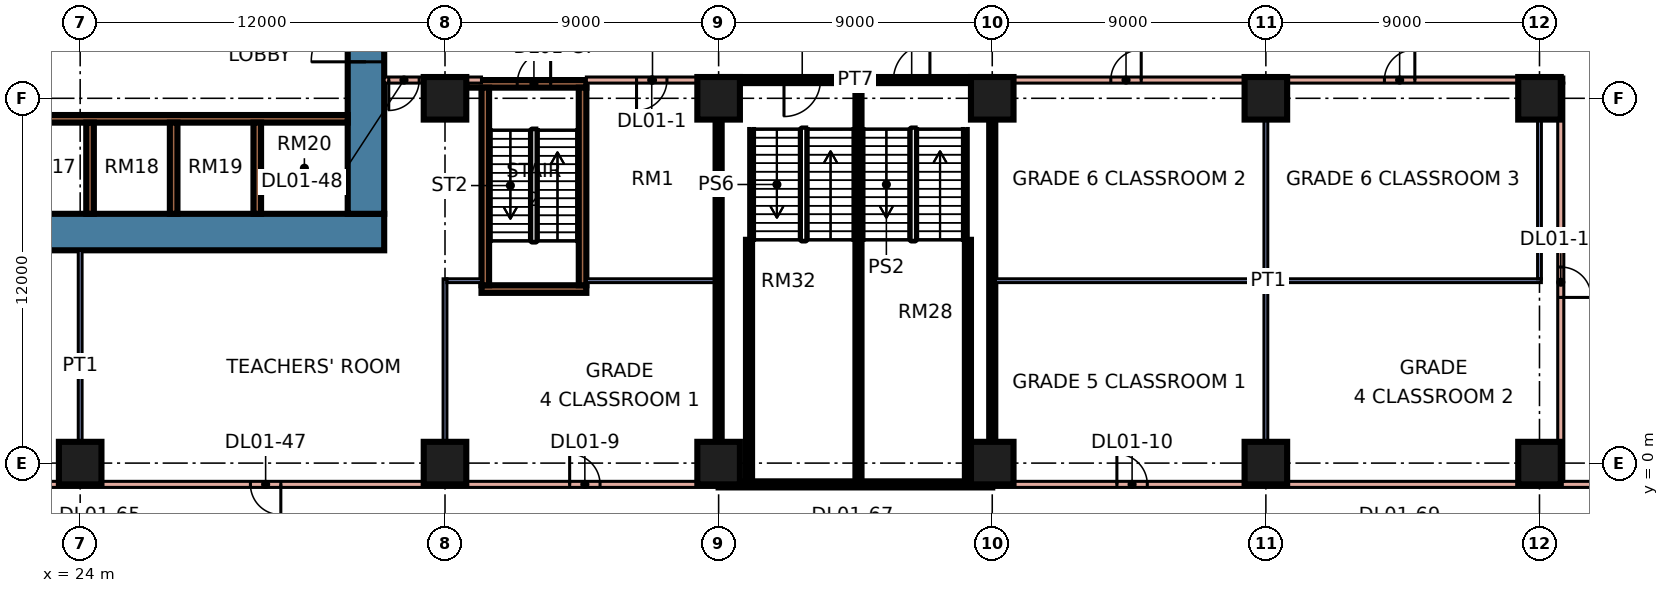
"""IFC4 building model, lengths in metres.
Left out: names, types, materials, properties, quantities, classifications, styles, units other than length and angle.
Written with IfcOpenShell. Run it as: python <this file> out.ifc"""

import sys

from ifc_helpers import new_model, si_unit, direction, frame, frame_2d, origin, origin_2d, place, context, subcontext, project, spatial, rectangle, extrude, element, fill, save


model = new_model("IFC4")
c1 = context("Model", 3, precision=1e-05, world=origin(), true_north=direction((0.0, 1.0)))
c2 = subcontext(c1, "Body", "Model", "MODEL_VIEW")
j1 = project(units=[si_unit("LENGTHUNIT", "METRE"), si_unit("PLANEANGLEUNIT", "RADIAN")], contexts=[c1])
p1 = place(None, origin())
s1 = spatial("IfcSite", under=j1, at=p1, CompositionType="ELEMENT")
p2 = place(p1, origin())
s2 = spatial("IfcBuilding", under=s1, at=p2, CompositionType="ELEMENT")
p3 = place(p2, frame((0.0, 0.0, 7.2)))
s3 = spatial("IfcBuildingStorey", under=s2, at=p3, CompositionType="ELEMENT", Elevation=7.2)
for number, where, z_axis, x_axis in (
    (1, (24.0, 0.0, 0.0), (0.0, 0.0, 1.0), (1.0, 0.0, 0.0)),
    (2, (36.0, 0.0, 0.0), (0.0, 0.0, 1.0), (1.0, 0.0, 0.0)),
    (3, (45.0, 0.0, 0.0), (0.0, 0.0, 1.0), (1.0, 0.0, 0.0)),
    (4, (54.0, 0.0, 0.0), (0.0, 0.0, 1.0), (1.0, 0.0, 0.0)),
    (5, (63.0, 0.0, 0.0), (0.0, 0.0, 1.0), (1.0, 0.0, 0.0)),
    (6, (72.0, 0.0, 0.0), (0.0, 0.0, 1.0), (1.0, 0.0, 0.0)),
    (7, (36.0, 12.0, 0.0), (0.0, 0.0, 1.0), (1.0, 0.0, 0.0)),
    (8, (45.0, 12.0, 0.0), (0.0, 0.0, 1.0), (1.0, 0.0, 0.0)),
    (9, (54.0, 12.0, 0.0), (0.0, 0.0, 1.0), (1.0, 0.0, 0.0)),
    (10, (63.0, 12.0, 0.0), (0.0, 0.0, 1.0), (1.0, 0.0, 0.0)),
    (11, (72.0, 12.0, 0.0), (0.0, 0.0, 1.0), (1.0, 0.0, 0.0)),
):
    element("IfcColumn", number, at=place(p3, frame(where, z_axis=z_axis, x_axis=x_axis)), inside=s3, PredefinedType="COLUMN", context=c2, shape_type="SweptSolid", body=[
        extrude(rectangle(XDim=1.4, YDim=1.4, at=origin_2d()), origin(), (0.0, 0.0, 1.0), 4.8),
    ])
p4 = place(p3, frame((9.0, 7.6, 0.0), z_axis=(0.0, 0.0, 1.0), x_axis=(1.0, 0.0, 0.0)))
e12 = element("IfcWall", 12, at=p4, inside=s3, PredefinedType="SHEAR", context=c2, shape_type="SweptSolid", body=[
    extrude(rectangle(XDim=25.0, YDim=1.2, at=frame_2d((12.5, 0.0))), origin(), (0.0, 0.0, 1.0), 4.8),
])
p5 = place(p3, frame((33.4, 8.2, 0.0), z_axis=(0.0, 0.0, 1.0), x_axis=(0.0, 1.0, 0.0)))
e13 = element("IfcWall", 13, at=p5, inside=s3, PredefinedType="SHEAR", context=c2, shape_type="SweptSolid", body=[
    extrude(rectangle(XDim=10.6, YDim=1.2, at=frame_2d((5.3, 0.0))), origin(), (0.0, 0.0, 1.0), 4.8),
])
p6 = place(p5, frame((5.0, 0.0, 0.0)))
e14 = element("IfcOpeningElement", 14, at=p6, cuts=e13, PredefinedType="OPENING", context=c2, shape_type="SweptSolid", body=[
    extrude(rectangle(XDim=1.8, YDim=2.4, at=frame_2d((0.9, 1.2))), frame((0.0, 0.61, 0.0), z_axis=(0.0, -1.0, 0.0), x_axis=(1.0, 0.0, 0.0)), (0.0, 0.0, 1.0), 1.22),
])
p7 = place(p3, frame((13.45, 11.325, 0.0), z_axis=(0.0, 0.0, 1.0), x_axis=(1.0, 0.0, 0.0)))
e15 = element("IfcWall", 15, at=p7, inside=s3, PredefinedType="SHEAR", context=c2, shape_type="SweptSolid", body=[
    extrude(rectangle(XDim=19.35, YDim=0.25, at=frame_2d((9.675, 0.0))), origin(), (0.0, 0.0, 1.0), 4.8),
])
for number, where, z_axis, x_axis in (
    (16, (24.325, 8.2, 0.0), (0.0, 0.0, 1.0), (0.0, 1.0, 0.0)),
    (17, (27.075, 8.2, 0.0), (0.0, 0.0, 1.0), (0.0, 1.0, 0.0)),
    (18, (29.825, 8.2, 0.0), (0.0, 0.0, 1.0), (0.0, 1.0, 0.0)),
):
    element("IfcWall", number, at=place(p3, frame(where, z_axis=z_axis, x_axis=x_axis)), inside=s3, PredefinedType="SHEAR", context=c2, shape_type="SweptSolid", body=[
        extrude(rectangle(XDim=3.0, YDim=0.25, at=frame_2d((1.5, 0.0))), origin(), (0.0, 0.0, 1.0), 4.8),
    ])
p8 = place(p3, frame((37.2, 5.725, 0.0), z_axis=(0.0, 0.0, 1.0), x_axis=(1.0, 0.0, 0.0)))
e19 = element("IfcWall", 19, at=p8, inside=s3, PredefinedType="SHEAR", context=c2, shape_type="SweptSolid", body=[
    extrude(rectangle(XDim=3.45, YDim=0.25, at=frame_2d((1.725, 0.0))), origin(), (0.0, 0.0, 1.0), 4.8),
])
p9 = place(p3, frame((36.7, 12.475, 0.0), z_axis=(0.0, 0.0, 1.0), x_axis=(1.0, 0.0, 0.0)))
e20 = element("IfcWall", 20, at=p9, inside=s3, PredefinedType="SHEAR", context=c2, shape_type="SweptSolid", body=[
    extrude(rectangle(XDim=3.95, YDim=0.25, at=frame_2d((1.975, 0.0))), origin(), (0.0, 0.0, 1.0), 4.8),
])
p10 = place(p9, frame((1.675, 0.0, 0.0)))
e21 = element("IfcOpeningElement", 21, at=p10, cuts=e20, PredefinedType="OPENING", context=c2, shape_type="SweptSolid", body=[
    extrude(rectangle(XDim=1.1, YDim=2.2, at=frame_2d((0.55, 1.1))), frame((0.0, 0.135, 0.0), z_axis=(0.0, -1.0, 0.0), x_axis=(1.0, 0.0, 0.0)), (0.0, 0.0, 1.0), 0.27),
])
for number, where, z_axis, x_axis in (
    (22, (37.325, 5.85, 0.0), (0.0, 0.0, 1.0), (0.0, 1.0, 0.0)),
    (23, (40.525, 5.85, 0.0), (0.0, 0.0, 1.0), (0.0, 1.0, 0.0)),
):
    element("IfcWall", number, at=place(p3, frame(where, z_axis=z_axis, x_axis=x_axis)), inside=s3, PredefinedType="SHEAR", context=c2, shape_type="SweptSolid", body=[
        extrude(rectangle(XDim=6.5, YDim=0.25, at=frame_2d((3.25, 0.0))), origin(), (0.0, 0.0, 1.0), 4.8),
    ])
p11 = place(p3, frame((-0.8, -0.7, 0.0), z_axis=(0.0, 0.0, 1.0), x_axis=(1.0, 0.0, 0.0)))
e24 = element("IfcWall", 24, at=p11, inside=s3, PredefinedType="PARTITIONING", context=c2, shape_type="SweptSolid", body=[
    extrude(rectangle(XDim=45.8, YDim=0.2, at=frame_2d((22.9, 0.0))), origin(), (0.0, 0.0, 1.0), 4.4),
])
p12 = place(p11, frame((40.9, 0.0, 0.0)))
e25 = element("IfcOpeningElement", 25, at=p12, cuts=e24, PredefinedType="OPENING", context=c2, shape_type="SweptSolid", body=[
    extrude(rectangle(XDim=1.0, YDim=2.1, at=frame_2d((0.5, 1.05))), frame((0.0, 0.11, 0.0), z_axis=(0.0, -1.0, 0.0), x_axis=(1.0, 0.0, 0.0)), (0.0, 0.0, 1.0), 0.22),
])
p13 = place(p11, frame((5.9, 0.0, 0.0)))
e26 = element("IfcOpeningElement", 26, at=p13, cuts=e24, PredefinedType="OPENING", context=c2, shape_type="SweptSolid", body=[
    extrude(rectangle(XDim=1.0, YDim=2.1, at=frame_2d((0.5, 1.05))), frame((0.0, 0.11, 0.0), z_axis=(0.0, -1.0, 0.0), x_axis=(1.0, 0.0, 0.0)), (0.0, 0.0, 1.0), 0.22),
])
p14 = place(p11, frame((10.9, 0.0, 0.0)))
e27 = element("IfcOpeningElement", 27, at=p14, cuts=e24, PredefinedType="OPENING", context=c2, shape_type="SweptSolid", body=[
    extrude(rectangle(XDim=1.0, YDim=2.1, at=frame_2d((0.5, 1.05))), frame((0.0, 0.11, 0.0), z_axis=(0.0, -1.0, 0.0), x_axis=(1.0, 0.0, 0.0)), (0.0, 0.0, 1.0), 0.22),
])
p15 = place(p11, frame((18.4, 0.0, 0.0)))
e28 = element("IfcOpeningElement", 28, at=p15, cuts=e24, PredefinedType="OPENING", context=c2, shape_type="SweptSolid", body=[
    extrude(rectangle(XDim=1.0, YDim=2.1, at=frame_2d((0.5, 1.05))), frame((0.0, 0.11, 0.0), z_axis=(0.0, -1.0, 0.0), x_axis=(1.0, 0.0, 0.0)), (0.0, 0.0, 1.0), 0.22),
])
p16 = place(p11, frame((30.4, 0.0, 0.0)))
e29 = element("IfcOpeningElement", 29, at=p16, cuts=e24, PredefinedType="OPENING", context=c2, shape_type="SweptSolid", body=[
    extrude(rectangle(XDim=1.0, YDim=2.1, at=frame_2d((0.5, 1.05))), frame((0.0, 0.11, 0.0), z_axis=(0.0, -1.0, 0.0), x_axis=(1.0, 0.0, 0.0)), (0.0, 0.0, 1.0), 0.22),
])
p17 = place(p3, frame((24.0, -0.6, 0.0), z_axis=(0.0, 0.0, 1.0), x_axis=(0.0, 1.0, 0.0)))
e30 = element("IfcWall", 30, at=p17, inside=s3, PredefinedType="PARTITIONING", context=c2, shape_type="SweptSolid", body=[
    extrude(rectangle(XDim=7.6, YDim=0.125, at=frame_2d((3.8, 0.0))), origin(), (0.0, 0.0, 1.0), 4.4),
])
p18 = place(p3, frame((34.0, 12.6, 0.0), z_axis=(0.0, 0.0, 1.0), x_axis=(1.0, 0.0, 0.0)))
e31 = element("IfcWall", 31, at=p18, inside=s3, PredefinedType="PARTITIONING", context=c2, shape_type="SweptSolid", body=[
    extrude(rectangle(XDim=3.2, YDim=0.2, at=frame_2d((1.6, 0.0))), origin(), (0.0, 0.0, 1.0), 4.4),
])
p19 = place(p18, frame((0.15, 0.0, 0.0)))
e32 = element("IfcOpeningElement", 32, at=p19, cuts=e31, PredefinedType="OPENING", context=c2, shape_type="SweptSolid", body=[
    extrude(rectangle(XDim=1.0, YDim=2.1, at=frame_2d((0.5, 1.05))), frame((0.0, 0.11, 0.0), z_axis=(0.0, -1.0, 0.0), x_axis=(1.0, 0.0, 0.0)), (0.0, 0.0, 1.0), 0.22),
])
p20 = place(p3, frame((36.0, -0.6, 0.0), z_axis=(0.0, 0.0, 1.0), x_axis=(0.0, 1.0, 0.0)))
e33 = element("IfcWall", 33, at=p20, inside=s3, PredefinedType="PARTITIONING", context=c2, shape_type="SweptSolid", body=[
    extrude(rectangle(XDim=6.662, YDim=0.125, at=frame_2d((3.331, 0.0))), origin(), (0.0, 0.0, 1.0), 4.4),
])
p21 = place(p3, frame((36.062, 6.0, 0.0), z_axis=(0.0, 0.0, 1.0), x_axis=(1.0, 0.0, 0.0)))
e34 = element("IfcWall", 34, at=p21, inside=s3, PredefinedType="PARTITIONING", context=c2, shape_type="SweptSolid", body=[
    extrude(rectangle(XDim=1.138, YDim=0.125, at=frame_2d((0.569, 0.0))), origin(), (0.0, 0.0, 1.0), 4.4),
])
p22 = place(p3, frame((40.65, 6.0, 0.0), z_axis=(0.0, 0.0, 1.0), x_axis=(1.0, 0.0, 0.0)))
e35 = element("IfcWall", 35, at=p22, inside=s3, PredefinedType="PARTITIONING", context=c2, shape_type="SweptSolid", body=[
    extrude(rectangle(XDim=4.25, YDim=0.125, at=frame_2d((2.125, 0.0))), origin(), (0.0, 0.0, 1.0), 4.4),
])
p23 = place(p3, frame((40.65, 12.6, 0.0), z_axis=(0.0, 0.0, 1.0), x_axis=(1.0, 0.0, 0.0)))
e36 = element("IfcWall", 36, at=p23, inside=s3, PredefinedType="PARTITIONING", context=c2, shape_type="SweptSolid", body=[
    extrude(rectangle(XDim=4.35, YDim=0.2, at=frame_2d((2.175, 0.0))), origin(), (0.0, 0.0, 1.0), 4.4),
])
p24 = place(p23, frame((1.65, 0.0, 0.0)))
e37 = element("IfcOpeningElement", 37, at=p24, cuts=e36, PredefinedType="OPENING", context=c2, shape_type="SweptSolid", body=[
    extrude(rectangle(XDim=1.0, YDim=2.1, at=frame_2d((0.5, 1.05))), frame((0.0, 0.11, 0.0), z_axis=(0.0, -1.0, 0.0), x_axis=(1.0, 0.0, 0.0)), (0.0, 0.0, 1.0), 0.22),
])
p25 = place(p3, frame((45.0, -0.7, 0.0), z_axis=(0.0, 0.0, 1.0), x_axis=(1.0, 0.0, 0.0)))
e38 = element("IfcWall", 38, at=p25, inside=s3, PredefinedType="SOLIDWALL", context=c2, shape_type="SweptSolid", body=[
    extrude(rectangle(XDim=9.0, YDim=0.2, at=frame_2d((4.5, 0.0))), origin(), (0.0, 0.0, 1.0), 4.4),
])
p26 = place(p3, frame((45.0, -0.6, 0.0), z_axis=(0.0, 0.0, 1.0), x_axis=(0.0, 1.0, 0.0)))
e39 = element("IfcWall", 39, at=p26, inside=s3, PredefinedType="SOLIDWALL", context=c2, shape_type="SweptSolid", body=[
    extrude(rectangle(XDim=13.1, YDim=0.2, at=frame_2d((6.55, 0.0))), origin(), (0.0, 0.0, 1.0), 4.4),
])
p27 = place(p3, frame((45.0, 12.6, 0.0), z_axis=(0.0, 0.0, 1.0), x_axis=(1.0, 0.0, 0.0)))
e40 = element("IfcWall", 40, at=p27, inside=s3, PredefinedType="SOLIDWALL", context=c2, shape_type="SweptSolid", body=[
    extrude(rectangle(XDim=9.0, YDim=0.2, at=frame_2d((4.5, 0.0))), origin(), (0.0, 0.0, 1.0), 4.4),
])
p28 = place(p27, frame((5.75, 0.0, 0.0)))
e41 = element("IfcOpeningElement", 41, at=p28, cuts=e40, PredefinedType="OPENING", context=c2, shape_type="SweptSolid", body=[
    extrude(rectangle(XDim=1.2, YDim=2.1, at=frame_2d((0.6, 1.05))), frame((0.0, 0.11, 0.0), z_axis=(0.0, -1.0, 0.0), x_axis=(1.0, 0.0, 0.0)), (0.0, 0.0, 1.0), 0.22),
])
p29 = place(p27, frame((2.15, 0.0, 0.0)))
e42 = element("IfcOpeningElement", 42, at=p29, cuts=e40, PredefinedType="OPENING", context=c2, shape_type="SweptSolid", body=[
    extrude(rectangle(XDim=1.2, YDim=2.1, at=frame_2d((0.6, 1.05))), frame((0.0, 0.11, 0.0), z_axis=(0.0, -1.0, 0.0), x_axis=(1.0, 0.0, 0.0)), (0.0, 0.0, 1.0), 0.22),
])
p30 = place(p3, frame((49.6, -0.6, 0.0), z_axis=(0.0, 0.0, 1.0), x_axis=(0.0, 1.0, 0.0)))
e43 = element("IfcWall", 43, at=p30, inside=s3, PredefinedType="SOLIDWALL", context=c2, shape_type="SweptSolid", body=[
    extrude(rectangle(XDim=13.1, YDim=0.2, at=frame_2d((6.55, 0.0))), origin(), (0.0, 0.0, 1.0), 4.4),
])
p31 = place(p3, frame((54.0, -0.7, 0.0), z_axis=(0.0, 0.0, 1.0), x_axis=(1.0, 0.0, 0.0)))
e44 = element("IfcWall", 44, at=p31, inside=s3, PredefinedType="PARTITIONING", context=c2, shape_type="SweptSolid", body=[
    extrude(rectangle(XDim=21.0, YDim=0.2, at=frame_2d((10.5, 0.0))), origin(), (0.0, 0.0, 1.0), 4.4),
])
p32 = place(p31, frame((4.1, 0.0, 0.0)))
e45 = element("IfcOpeningElement", 45, at=p32, cuts=e44, PredefinedType="OPENING", context=c2, shape_type="SweptSolid", body=[
    extrude(rectangle(XDim=1.0, YDim=2.1, at=frame_2d((0.5, 1.05))), frame((0.0, 0.11, 0.0), z_axis=(0.0, -1.0, 0.0), x_axis=(1.0, 0.0, 0.0)), (0.0, 0.0, 1.0), 0.22),
])
p33 = place(p3, frame((54.0, -0.6, 0.0), z_axis=(0.0, 0.0, 1.0), x_axis=(0.0, 1.0, 0.0)))
e46 = element("IfcWall", 46, at=p33, inside=s3, PredefinedType="SOLIDWALL", context=c2, shape_type="SweptSolid", body=[
    extrude(rectangle(XDim=13.1, YDim=0.2, at=frame_2d((6.55, 0.0))), origin(), (0.0, 0.0, 1.0), 4.4),
])
p34 = place(p3, frame((54.0, 12.6, 0.0), z_axis=(0.0, 0.0, 1.0), x_axis=(1.0, 0.0, 0.0)))
e47 = element("IfcWall", 47, at=p34, inside=s3, PredefinedType="PARTITIONING", context=c2, shape_type="SweptSolid", body=[
    extrude(rectangle(XDim=18.8, YDim=0.2, at=frame_2d((9.4, 0.0))), origin(), (0.0, 0.0, 1.0), 4.4),
])
p35 = place(p34, frame((3.9, 0.0, 0.0)))
e48 = element("IfcOpeningElement", 48, at=p35, cuts=e47, PredefinedType="OPENING", context=c2, shape_type="SweptSolid", body=[
    extrude(rectangle(XDim=1.0, YDim=2.1, at=frame_2d((0.5, 1.05))), frame((0.0, 0.11, 0.0), z_axis=(0.0, -1.0, 0.0), x_axis=(1.0, 0.0, 0.0)), (0.0, 0.0, 1.0), 0.22),
])
p36 = place(p34, frame((12.9, 0.0, 0.0)))
e49 = element("IfcOpeningElement", 49, at=p36, cuts=e47, PredefinedType="OPENING", context=c2, shape_type="SweptSolid", body=[
    extrude(rectangle(XDim=1.0, YDim=2.1, at=frame_2d((0.5, 1.05))), frame((0.0, 0.11, 0.0), z_axis=(0.0, -1.0, 0.0), x_axis=(1.0, 0.0, 0.0)), (0.0, 0.0, 1.0), 0.22),
])
p37 = place(p3, frame((54.1, 6.0, 0.0), z_axis=(0.0, 0.0, 1.0), x_axis=(1.0, 0.0, 0.0)))
e50 = element("IfcWall", 50, at=p37, inside=s3, PredefinedType="PARTITIONING", context=c2, shape_type="SweptSolid", body=[
    extrude(rectangle(XDim=17.962, YDim=0.125, at=frame_2d((8.981, 0.0))), origin(), (0.0, 0.0, 1.0), 4.4),
])
p38 = place(p3, frame((63.0, -0.6, 0.0), z_axis=(0.0, 0.0, 1.0), x_axis=(0.0, 1.0, 0.0)))
e51 = element("IfcWall", 51, at=p38, inside=s3, PredefinedType="PARTITIONING", context=c2, shape_type="SweptSolid", body=[
    extrude(rectangle(XDim=6.538, YDim=0.125, at=frame_2d((3.269, 0.0))), origin(), (0.0, 0.0, 1.0), 4.4),
])
for number, where, z_axis, x_axis in (
    (52, (63.0, 6.062, 0.0), (0.0, 0.0, 1.0), (0.0, 1.0, 0.0)),
    (53, (72.0, 6.062, 0.0), (0.0, 0.0, 1.0), (0.0, 1.0, 0.0)),
):
    element("IfcWall", number, at=place(p3, frame(where, z_axis=z_axis, x_axis=x_axis)), inside=s3, PredefinedType="PARTITIONING", context=c2, shape_type="SweptSolid", body=[
        extrude(rectangle(XDim=6.438, YDim=0.125, at=frame_2d((3.219, 0.0))), origin(), (0.0, 0.0, 1.0), 4.4),
    ])
p39 = place(p3, frame((72.7, -0.6, 0.0), z_axis=(0.0, 0.0, 1.0), x_axis=(0.0, 1.0, 0.0)))
e54 = element("IfcWall", 54, at=p39, inside=s3, PredefinedType="PARTITIONING", context=c2, shape_type="SweptSolid", body=[
    extrude(rectangle(XDim=13.1, YDim=0.2, at=frame_2d((6.55, 0.0))), origin(), (0.0, 0.0, 1.0), 4.4),
])
p40 = place(p39, frame((6.05, 0.0, 0.0)))
e55 = element("IfcOpeningElement", 55, at=p40, cuts=e54, PredefinedType="OPENING", context=c2, shape_type="SweptSolid", body=[
    extrude(rectangle(XDim=1.0, YDim=2.1, at=frame_2d((0.5, 1.05))), frame((0.0, 0.11, 0.0), z_axis=(0.0, -1.0, 0.0), x_axis=(1.0, 0.0, 0.0)), (0.0, 0.0, 1.0), 0.22),
])
for number, where, z_axis, x_axis in (
    (56, (53.2, -0.6, 0.0), (0.0, 0.0, 1.0), (0.0, 1.0, 0.0)),
    (57, (46.0, -0.6, 0.0), (0.0, 0.0, 1.0), (0.0, 1.0, 0.0)),
):
    element("IfcWall", number, at=place(p3, frame(where, z_axis=z_axis, x_axis=x_axis)), inside=s3, PredefinedType="SOLIDWALL", context=c2, shape_type="SweptSolid", body=[
        extrude(rectangle(XDim=7.945, YDim=0.2, at=frame_2d((3.973, 0.0))), origin(), (0.0, 0.0, 1.0), 4.4),
    ])
p41 = place(p6, origin())
e58 = element("IfcDoor", 58, at=p41, inside=s3, OperationType="DOUBLE_DOOR_SINGLE_SWING", PredefinedType="DOOR", context=c2, shape_type="SweptSolid", body=[
    extrude(rectangle(XDim=1.8, YDim=2.4, at=frame_2d((0.9, 1.2))), frame((0.0, 0.025, 0.0), z_axis=(0.0, -1.0, 0.0), x_axis=(1.0, 0.0, 0.0)), (0.0, 0.0, 1.0), 0.05),
])
fill(e14, e58)
p42 = place(p10, frame((1.1, 0.0, 0.0), z_axis=(0.0, 0.0, 1.0), x_axis=(-1.0, 0.0, 0.0)))
e59 = element("IfcDoor", 59, at=p42, inside=s3, OperationType="SINGLE_SWING_RIGHT", PredefinedType="DOOR", context=c2, shape_type="SweptSolid", body=[
    extrude(rectangle(XDim=1.1, YDim=2.2, at=frame_2d((0.55, 1.1))), frame((0.0, 0.025, 0.0), z_axis=(0.0, -1.0, 0.0), x_axis=(1.0, 0.0, 0.0)), (0.0, 0.0, 1.0), 0.05),
])
fill(e21, e59)
p43 = place(p24, frame((1.0, 0.0, 0.0), z_axis=(0.0, 0.0, 1.0), x_axis=(-1.0, 0.0, 0.0)))
e60 = element("IfcDoor", 60, at=p43, inside=s3, OperationType="SINGLE_SWING_LEFT", PredefinedType="DOOR", context=c2, shape_type="SweptSolid", body=[
    extrude(rectangle(XDim=1.0, YDim=2.1, at=frame_2d((0.5, 1.05))), frame((0.0, 0.025, 0.0), z_axis=(0.0, -1.0, 0.0), x_axis=(1.0, 0.0, 0.0)), (0.0, 0.0, 1.0), 0.05),
])
fill(e37, e60)
p44 = place(p35, frame((1.0, 0.0, 0.0), z_axis=(0.0, 0.0, 1.0), x_axis=(-1.0, 0.0, 0.0)))
e61 = element("IfcDoor", 61, at=p44, inside=s3, OperationType="SINGLE_SWING_RIGHT", PredefinedType="DOOR", context=c2, shape_type="SweptSolid", body=[
    extrude(rectangle(XDim=1.0, YDim=2.1, at=frame_2d((0.5, 1.05))), frame((0.0, 0.025, 0.0), z_axis=(0.0, -1.0, 0.0), x_axis=(1.0, 0.0, 0.0)), (0.0, 0.0, 1.0), 0.05),
])
fill(e48, e61)
p45 = place(p36, frame((1.0, 0.0, 0.0), z_axis=(0.0, 0.0, 1.0), x_axis=(-1.0, 0.0, 0.0)))
e62 = element("IfcDoor", 62, at=p45, inside=s3, OperationType="SINGLE_SWING_RIGHT", PredefinedType="DOOR", context=c2, shape_type="SweptSolid", body=[
    extrude(rectangle(XDim=1.0, YDim=2.1, at=frame_2d((0.5, 1.05))), frame((0.0, 0.025, 0.0), z_axis=(0.0, -1.0, 0.0), x_axis=(1.0, 0.0, 0.0)), (0.0, 0.0, 1.0), 0.05),
])
fill(e49, e62)
p46 = place(p12, origin())
e63 = element("IfcDoor", 63, at=p46, inside=s3, OperationType="SINGLE_SWING_LEFT", PredefinedType="DOOR", context=c2, shape_type="SweptSolid", body=[
    extrude(rectangle(XDim=1.0, YDim=2.1, at=frame_2d((0.5, 1.05))), frame((0.0, 0.025, 0.0), z_axis=(0.0, -1.0, 0.0), x_axis=(1.0, 0.0, 0.0)), (0.0, 0.0, 1.0), 0.05),
])
fill(e25, e63)
p47 = place(p32, origin())
e64 = element("IfcDoor", 64, at=p47, inside=s3, OperationType="SINGLE_SWING_LEFT", PredefinedType="DOOR", context=c2, shape_type="SweptSolid", body=[
    extrude(rectangle(XDim=1.0, YDim=2.1, at=frame_2d((0.5, 1.05))), frame((0.0, 0.025, 0.0), z_axis=(0.0, -1.0, 0.0), x_axis=(1.0, 0.0, 0.0)), (0.0, 0.0, 1.0), 0.05),
])
fill(e45, e64)
p48 = place(p40, frame((1.0, 0.0, 0.0), z_axis=(0.0, 0.0, 1.0), x_axis=(-1.0, 0.0, 0.0)))
e65 = element("IfcDoor", 65, at=p48, inside=s3, OperationType="SINGLE_SWING_LEFT", PredefinedType="DOOR", context=c2, shape_type="SweptSolid", body=[
    extrude(rectangle(XDim=1.0, YDim=2.1, at=frame_2d((0.5, 1.05))), frame((0.0, 0.025, 0.0), z_axis=(0.0, -1.0, 0.0), x_axis=(1.0, 0.0, 0.0)), (0.0, 0.0, 1.0), 0.05),
])
fill(e55, e65)
p49 = place(p16, origin())
e66 = element("IfcDoor", 66, at=p49, inside=s3, OperationType="SINGLE_SWING_RIGHT", PredefinedType="DOOR", context=c2, shape_type="SweptSolid", body=[
    extrude(rectangle(XDim=1.0, YDim=2.1, at=frame_2d((0.5, 1.05))), frame((0.0, 0.025, 0.0), z_axis=(0.0, -1.0, 0.0), x_axis=(1.0, 0.0, 0.0)), (0.0, 0.0, 1.0), 0.05),
])
fill(e29, e66)
p50 = place(p19, frame((1.0, 0.0, 0.0), z_axis=(0.0, 0.0, 1.0), x_axis=(-1.0, 0.0, 0.0)))
e67 = element("IfcDoor", 67, at=p50, inside=s3, OperationType="SINGLE_SWING_LEFT", PredefinedType="DOOR", context=c2, shape_type="SweptSolid", body=[
    extrude(rectangle(XDim=1.0, YDim=2.1, at=frame_2d((0.5, 1.05))), frame((0.0, 0.025, 0.0), z_axis=(0.0, -1.0, 0.0), x_axis=(1.0, 0.0, 0.0)), (0.0, 0.0, 1.0), 0.05),
])
fill(e32, e67)
p51 = place(p28, frame((1.2, 0.0, 0.0), z_axis=(0.0, 0.0, 1.0), x_axis=(-1.0, 0.0, 0.0)))
e68 = element("IfcDoor", 68, at=p51, inside=s3, OperationType="SINGLE_SWING_RIGHT", PredefinedType="DOOR", context=c2, shape_type="SweptSolid", body=[
    extrude(rectangle(XDim=1.2, YDim=2.1, at=frame_2d((0.6, 1.05))), frame((0.0, 0.025, 0.0), z_axis=(0.0, -1.0, 0.0), x_axis=(1.0, 0.0, 0.0)), (0.0, 0.0, 1.0), 0.05),
])
fill(e41, e68)
p52 = place(p29, frame((1.2, 0.0, 0.0), z_axis=(0.0, 0.0, 1.0), x_axis=(-1.0, 0.0, 0.0)))
e69 = element("IfcDoor", 69, at=p52, inside=s3, OperationType="SINGLE_SWING_LEFT", PredefinedType="DOOR", context=c2, shape_type="SweptSolid", body=[
    extrude(rectangle(XDim=1.2, YDim=2.1, at=frame_2d((0.6, 1.05))), frame((0.0, 0.025, 0.0), z_axis=(0.0, -1.0, 0.0), x_axis=(1.0, 0.0, 0.0)), (0.0, 0.0, 1.0), 0.05),
])
fill(e42, e69)
save(model, sys.argv[1])
